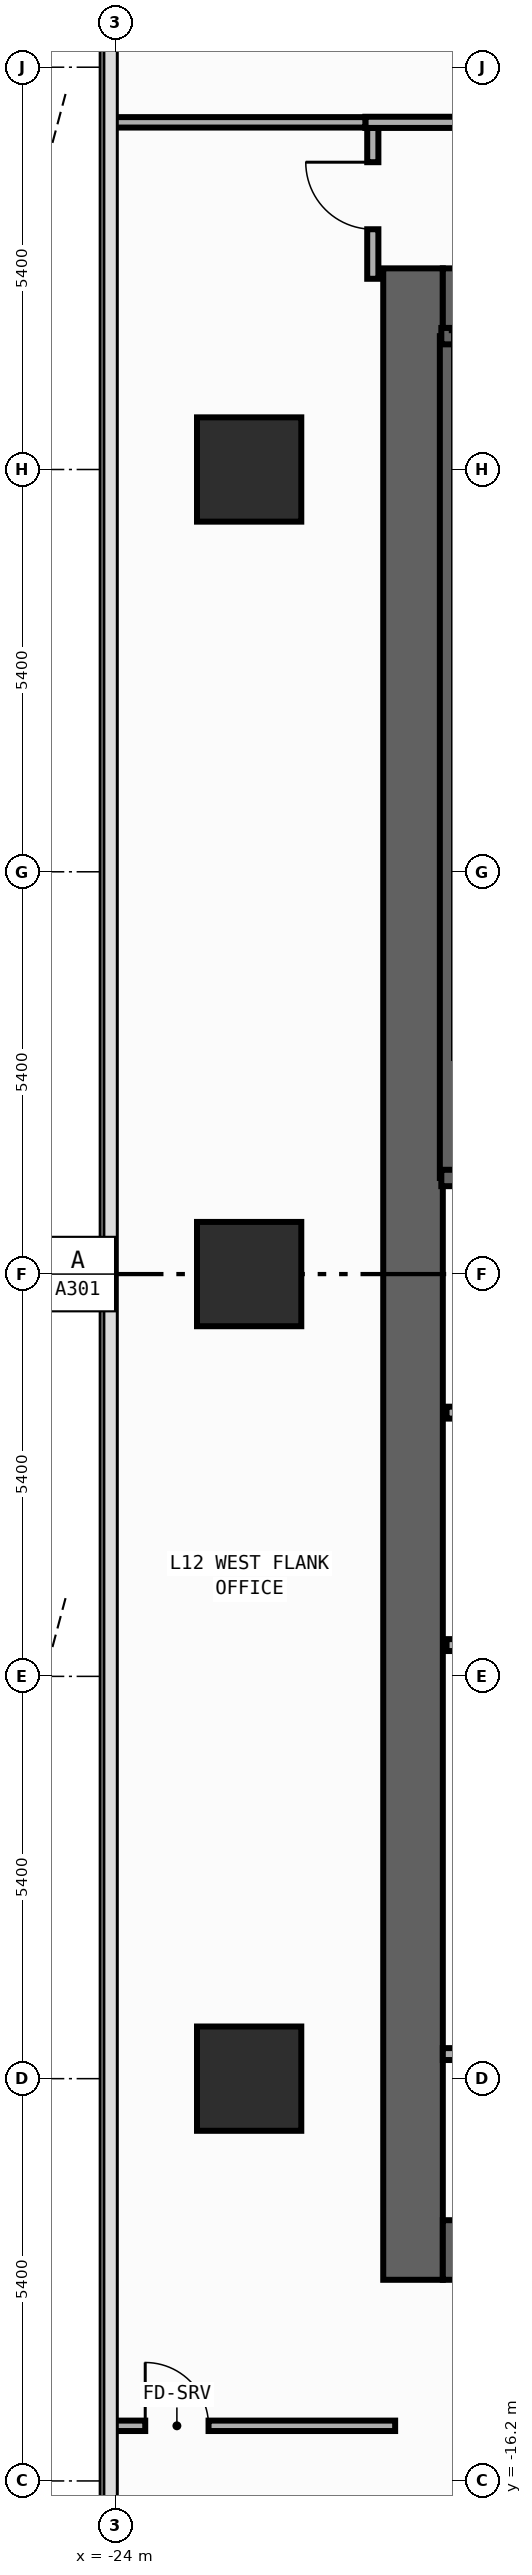
"""IFC4 building model, lengths in metres.
Left out: names, types, materials, properties, quantities, classifications, styles, units other than length and angle.
Written with IfcOpenShell. Run it as: python <this file> out.ifc"""

import sys

from ifc_helpers import new_model, si_unit, direction, frame, frame_2d, origin, origin_2d, place, context, subcontext, project, spatial, rectangle, extrude, element, fill, save


model = new_model("IFC4")
c1 = context("Model", 3, precision=1e-05, world=origin(), true_north=direction((0.0, 1.0)))
c2 = subcontext(c1, "Body", "Model", "MODEL_VIEW")
j1 = project(units=[si_unit("LENGTHUNIT", "METRE"), si_unit("PLANEANGLEUNIT", "RADIAN")], contexts=[c1])
p1 = place(None, origin())
s1 = spatial("IfcSite", under=j1, at=p1, CompositionType="ELEMENT")
p2 = place(p1, origin())
s2 = spatial("IfcBuilding", under=s1, at=p2, CompositionType="ELEMENT")
p3 = place(p2, frame((0.0, 0.0, 51.2)))
s3 = spatial("IfcBuildingStorey", under=s2, at=p3, CompositionType="ELEMENT", Elevation=51.2)
p4 = place(p3, frame((-20.0, -13.5, 0.0), z_axis=(0.0, 0.0, 1.0), x_axis=(0.0, 1.0, 0.0)))
e1 = element("IfcWall", 1, at=p4, inside=s3, PredefinedType="SHEAR", context=c2, shape_type="SweptSolid", body=[
    extrude(rectangle(XDim=27.0, YDim=0.8, at=frame_2d((13.5, 0.0))), origin(), (0.0, 0.0, 1.0), 3.94),
])
for number, where, z_axis, x_axis in (
    (2, (-19.6, -13.1, 0.0), (0.0, 0.0, 1.0), (1.0, 0.0, 0.0)),
    (3, (-19.6, 13.1, 0.0), (0.0, 0.0, 1.0), (1.0, 0.0, 0.0)),
):
    element("IfcWall", number, at=place(p3, frame(where, z_axis=z_axis, x_axis=x_axis)), inside=s3, PredefinedType="SHEAR", context=c2, shape_type="SweptSolid", body=[
        extrude(rectangle(XDim=6.8, YDim=0.8, at=frame_2d((3.4, 0.0))), origin(), (0.0, 0.0, 1.0), 3.94),
    ])
p5 = place(p3, frame((-19.53, 1.29, 0.0), z_axis=(0.0, 0.0, 1.0), x_axis=(0.0, 1.0, 0.0)))
e4 = element("IfcWall", 4, at=p5, inside=s3, PredefinedType="SHEAR", context=c2, shape_type="SweptSolid", body=[
    extrude(rectangle(XDim=11.3, YDim=0.22, at=frame_2d((5.65, 0.0))), origin(), (0.0, 0.0, 1.0), 3.94),
])
p6 = place(p3, frame((-19.62, 12.59, 0.0), z_axis=(0.0, 0.0, 1.0), x_axis=(1.0, 0.0, 0.0)))
e5 = element("IfcWall", 5, at=p6, inside=s3, PredefinedType="SHEAR", context=c2, shape_type="SweptSolid", body=[
    extrude(rectangle(XDim=3.915, YDim=0.22, at=frame_2d((1.958, 0.0))), origin(), (0.0, 0.0, 1.0), 3.94),
])
p7 = place(p3, frame((-19.62, 1.29, 0.0), z_axis=(0.0, 0.0, 1.0), x_axis=(1.0, 0.0, 0.0)))
e6 = element("IfcWall", 6, at=p7, inside=s3, PredefinedType="SHEAR", context=c2, shape_type="SweptSolid", body=[
    extrude(rectangle(XDim=3.915, YDim=0.22, at=frame_2d((1.958, 0.0))), origin(), (0.0, 0.0, 1.0), 3.94),
])
p8 = place(p7, frame((1.08, 0.0, 0.0)))
e7 = element("IfcOpeningElement", 7, at=p8, cuts=e6, PredefinedType="OPENING", context=c2, shape_type="SweptSolid", body=[
    extrude(rectangle(XDim=1.1, YDim=2.2, at=frame_2d((0.55, 1.1))), frame((0.0, 0.12, 0.0), z_axis=(0.0, -1.0, 0.0), x_axis=(1.0, 0.0, 0.0)), (0.0, 0.0, 1.0), 0.24),
])
for number, where, z_axis, x_axis in (
    (8, (-22.2, -10.8, 0.0), (0.0, 0.0, 1.0), (1.0, 0.0, 0.0)),
    (9, (-22.2, 0.0, 0.0), (0.0, 0.0, 1.0), (1.0, 0.0, 0.0)),
    (10, (-22.2, 10.8, 0.0), (0.0, 0.0, 1.0), (1.0, 0.0, 0.0)),
):
    element("IfcColumn", number, at=place(p3, frame(where, z_axis=z_axis, x_axis=x_axis)), inside=s3, PredefinedType="COLUMN", context=c2, shape_type="SweptSolid", body=[
        extrude(rectangle(XDim=1.4, YDim=1.4, at=origin_2d()), origin(), (0.0, 0.0, 1.0), 4.2),
    ])
p9 = place(p3, frame((-19.55, -1.86, 0.0), z_axis=(0.0, 0.0, 1.0), x_axis=(1.0, 0.0, 0.0)))
e11 = element("IfcWall", 11, at=p9, inside=s3, PredefinedType="STANDARD", context=c2, shape_type="SweptSolid", body=[
    extrude(rectangle(XDim=3.8, YDim=0.16, at=frame_2d((1.9, 0.0))), origin(), (0.0, 0.0, 1.0), 3.94),
])
p10 = place(p9, frame((1.18, 0.0, 0.0)))
e12 = element("IfcOpeningElement", 12, at=p10, cuts=e11, PredefinedType="OPENING", context=c2, shape_type="SweptSolid", body=[
    extrude(rectangle(XDim=1.15, YDim=2.2, at=frame_2d((0.575, 1.1))), frame((0.0, 0.09, 0.0), z_axis=(0.0, -1.0, 0.0), x_axis=(1.0, 0.0, 0.0)), (0.0, 0.0, 1.0), 0.18),
])
p11 = place(p3, frame((-19.55, -4.98, 0.0), z_axis=(0.0, 0.0, 1.0), x_axis=(1.0, 0.0, 0.0)))
e13 = element("IfcWall", 13, at=p11, inside=s3, PredefinedType="STANDARD", context=c2, shape_type="SweptSolid", body=[
    extrude(rectangle(XDim=3.8, YDim=0.16, at=frame_2d((1.9, 0.0))), origin(), (0.0, 0.0, 1.0), 3.94),
])
p12 = place(p3, frame((-19.6, -10.47, 0.0), z_axis=(0.0, 0.0, 1.0), x_axis=(1.0, 0.0, 0.0)))
e14 = element("IfcWall", 14, at=p12, inside=s3, PredefinedType="PARTITIONING", context=c2, shape_type="SweptSolid", body=[
    extrude(rectangle(XDim=2.29, YDim=0.16, at=frame_2d((1.145, 0.0))), origin(), (0.0, 0.0, 1.0), 3.94),
])
p13 = place(p3, frame((-20.54, 13.36, 0.0), z_axis=(0.0, 0.0, 1.0), x_axis=(0.0, 1.0, 0.0)))
e15 = element("IfcWall", 15, at=p13, inside=s3, PredefinedType="PARTITIONING", context=c2, shape_type="SweptSolid", body=[
    extrude(rectangle(XDim=2.025, YDim=0.15, at=frame_2d((1.012, 0.0))), origin(), (0.0, 0.0, 1.0), 3.94),
])
p14 = place(p13, frame((0.665, 0.0, 0.0)))
e16 = element("IfcOpeningElement", 16, at=p14, cuts=e15, PredefinedType="OPENING", context=c2, shape_type="SweptSolid", body=[
    extrude(rectangle(XDim=0.9, YDim=2.15, at=frame_2d((0.45, 1.075))), frame((0.0, 0.085, 0.0), z_axis=(0.0, -1.0, 0.0), x_axis=(1.0, 0.0, 0.0)), (0.0, 0.0, 1.0), 0.17),
])
p15 = place(p3, frame((-20.64, 15.46, 0.0), z_axis=(0.0, 0.0, 1.0), x_axis=(1.0, 0.0, 0.0)))
e17 = element("IfcWall", 17, at=p15, inside=s3, PredefinedType="PARTITIONING", context=c2, shape_type="SweptSolid", body=[
    extrude(rectangle(XDim=8.65, YDim=0.15, at=frame_2d((4.325, 0.0))), origin(), (0.0, 0.0, 1.0), 3.94),
])
p16 = place(p15, frame((2.871, 0.0, 0.0)))
e18 = element("IfcOpeningElement", 18, at=p16, cuts=e17, PredefinedType="OPENING", context=c2, shape_type="SweptSolid", body=[
    extrude(rectangle(XDim=0.9, YDim=2.15, at=frame_2d((0.45, 1.075))), frame((0.0, 0.085, 0.0), z_axis=(0.0, -1.0, 0.0), x_axis=(1.0, 0.0, 0.0)), (0.0, 0.0, 1.0), 0.17),
])
p17 = place(p3, frame((-24.055, 15.46, 0.0), z_axis=(0.0, 0.0, 1.0), x_axis=(1.0, 0.0, 0.0)))
e19 = element("IfcWall", 19, at=p17, inside=s3, PredefinedType="PARTITIONING", context=c2, shape_type="SweptSolid", body=[
    extrude(rectangle(XDim=3.415, YDim=0.14, at=frame_2d((1.708, 0.0))), origin(), (0.0, 0.0, 1.0), 3.94),
])
p18 = place(p3, frame((-24.055, -15.46, 0.0), z_axis=(0.0, 0.0, 1.0), x_axis=(1.0, 0.0, 0.0)))
e20 = element("IfcWall", 20, at=p18, inside=s3, PredefinedType="PARTITIONING", context=c2, shape_type="SweptSolid", body=[
    extrude(rectangle(XDim=3.815, YDim=0.14, at=frame_2d((1.907, 0.0))), origin(), (0.0, 0.0, 1.0), 3.94),
])
p19 = place(p18, frame((0.46, 0.0, 0.0)))
e21 = element("IfcOpeningElement", 21, at=p19, cuts=e20, PredefinedType="OPENING", context=c2, shape_type="SweptSolid", body=[
    extrude(rectangle(XDim=0.85, YDim=2.1, at=frame_2d((0.425, 1.05))), frame((0.0, 0.08, 0.0), z_axis=(0.0, -1.0, 0.0), x_axis=(1.0, 0.0, 0.0)), (0.0, 0.0, 1.0), 0.16),
])
p20 = place(p14, origin())
e22 = element("IfcDoor", 22, at=p20, inside=s3, OperationType="SINGLE_SWING_RIGHT", PredefinedType="DOOR", context=c2, shape_type="SweptSolid", body=[
    extrude(rectangle(XDim=0.9, YDim=2.15, at=frame_2d((0.45, 1.075))), frame((0.0, 0.025, 0.0), z_axis=(0.0, -1.0, 0.0), x_axis=(1.0, 0.0, 0.0)), (0.0, 0.0, 1.0), 0.05),
])
fill(e16, e22)
p21 = place(p19, origin())
e23 = element("IfcDoor", 23, at=p21, inside=s3, OperationType="SINGLE_SWING_LEFT", PredefinedType="DOOR", context=c2, shape_type="SweptSolid", body=[
    extrude(rectangle(XDim=0.85, YDim=2.1, at=frame_2d((0.425, 1.05))), frame((0.0, 0.025, 0.0), z_axis=(0.0, -1.0, 0.0), x_axis=(1.0, 0.0, 0.0)), (0.0, 0.0, 1.0), 0.05),
])
fill(e21, e23)
save(model, sys.argv[1])
